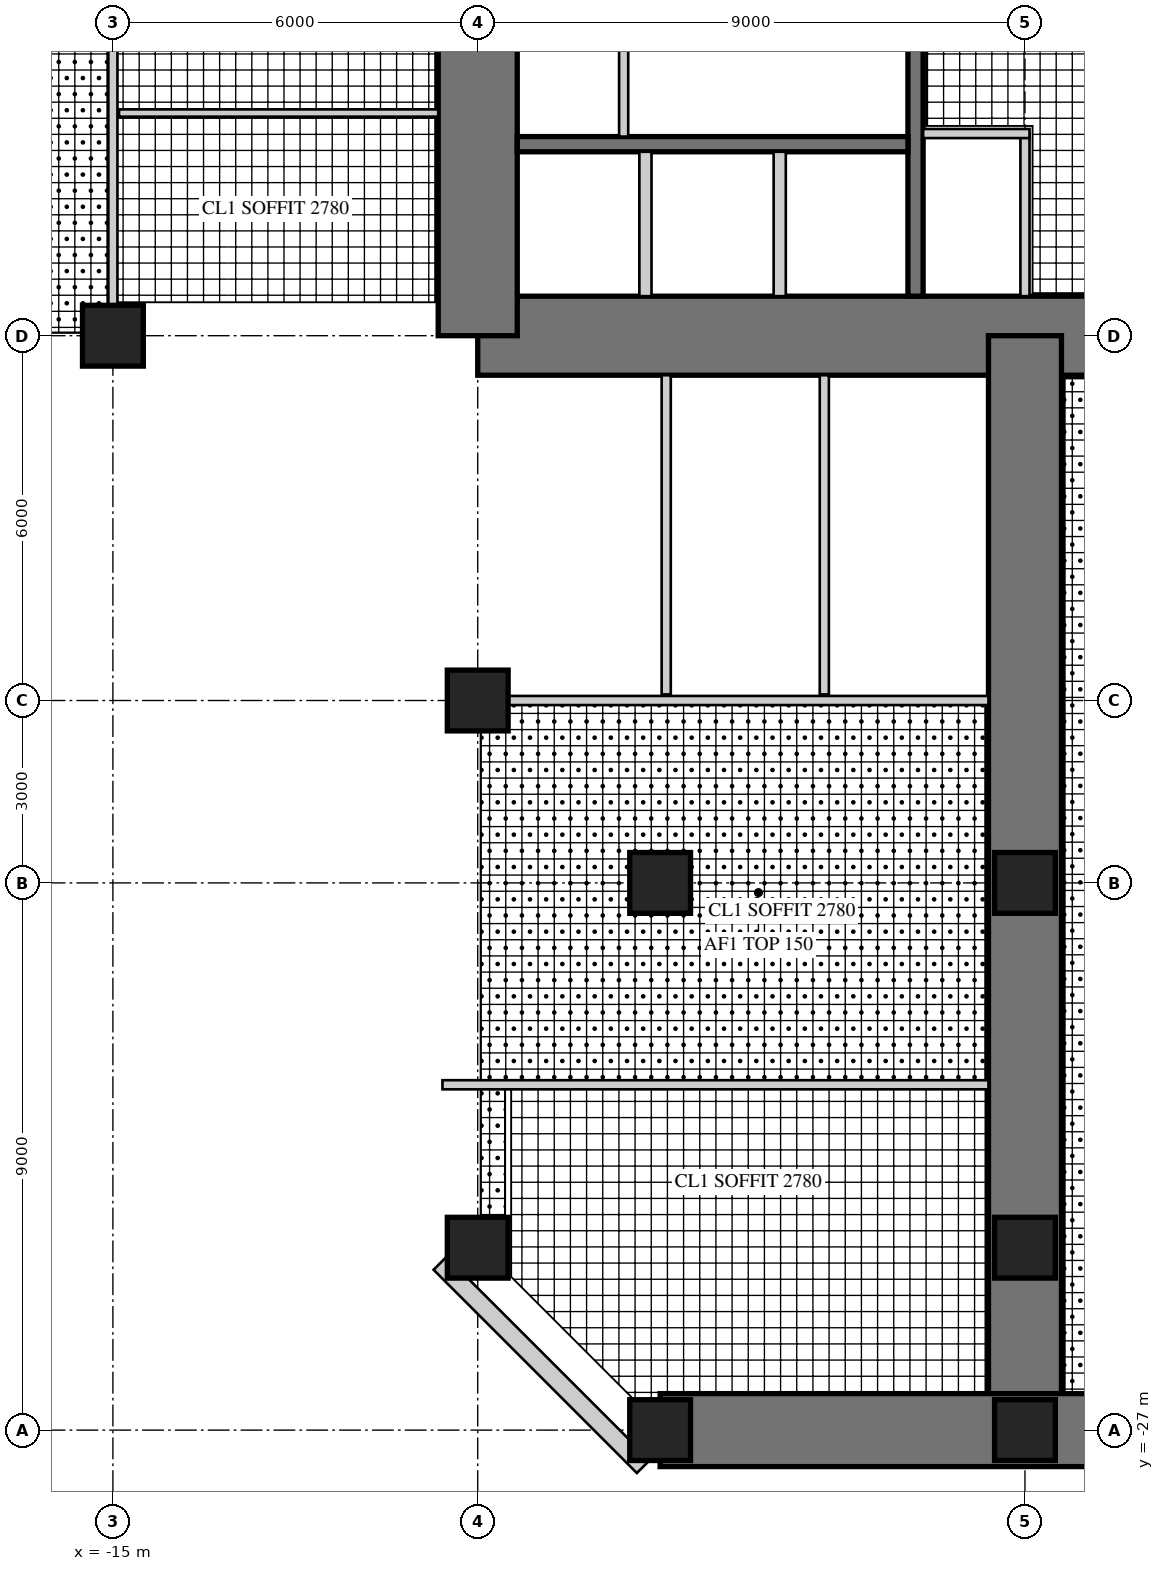
"""IFC4 building model, lengths in metres.
Left out: names, types, materials, properties, quantities, classifications, styles, units other than length and angle.
Written with IfcOpenShell. Run it as: python <this file> out.ifc"""

import sys

from ifc_helpers import new_model, si_unit, direction, frame, frame_2d, origin, origin_2d, place, context, subcontext, project, spatial, rectangle, hollow_rectangle, extrude, element, fill, save


model = new_model("IFC4")
c1 = context("Model", 3, precision=1e-05, world=origin(), true_north=direction((0.0, 1.0)))
c2 = subcontext(c1, "Body", "Model", "MODEL_VIEW")
j1 = project(units=[si_unit("LENGTHUNIT", "METRE"), si_unit("PLANEANGLEUNIT", "RADIAN")], contexts=[c1])
p1 = place(None, origin())
s1 = spatial("IfcSite", under=j1, at=p1, CompositionType="ELEMENT")
p2 = place(p1, origin())
s2 = spatial("IfcBuilding", under=s1, at=p2, CompositionType="ELEMENT")
p3 = place(p2, frame((0.0, 0.0, 136.5)))
s3 = spatial("IfcBuildingStorey", under=s2, at=p3, CompositionType="ELEMENT", Elevation=136.5)
p4 = place(p3, frame((-9.0, -9.0, 0.0), z_axis=(0.0, 0.0, 1.0), x_axis=(1.0, 0.0, 0.0)))
e1 = element("IfcWall", 1, at=p4, inside=s3, PredefinedType="SHEAR", context=c2, shape_type="SweptSolid", body=[
    extrude(rectangle(XDim=18.0, YDim=1.3, at=frame_2d((9.0, 0.0))), origin(), (0.0, 0.0, 1.0), 4.0),
])
p5 = place(p4, frame((9.8, 0.0, 0.0)))
e2 = element("IfcOpeningElement", 2, at=p5, cuts=e1, PredefinedType="OPENING", context=c2, shape_type="SweptSolid", body=[
    extrude(rectangle(XDim=1.0, YDim=2.4, at=frame_2d((0.5, 1.2))), frame((0.0, 0.66, 0.0), z_axis=(0.0, -1.0, 0.0), x_axis=(1.0, 0.0, 0.0)), (0.0, 0.0, 1.0), 1.32),
])
p6 = place(p3, frame((-9.0, 9.0, 0.0), z_axis=(0.0, 0.0, 1.0), x_axis=(0.0, -1.0, 0.0)))
e3 = element("IfcWall", 3, at=p6, inside=s3, PredefinedType="SHEAR", context=c2, shape_type="SweptSolid", body=[
    extrude(rectangle(XDim=18.0, YDim=1.3, at=frame_2d((9.0, 0.0))), origin(), (0.0, 0.0, 1.0), 4.0),
])
p7 = place(p6, frame((9.8, 0.0, 0.0)))
e4 = element("IfcOpeningElement", 4, at=p7, cuts=e3, PredefinedType="OPENING", context=c2, shape_type="SweptSolid", body=[
    extrude(rectangle(XDim=1.0, YDim=2.4, at=frame_2d((0.5, 1.2))), frame((0.0, 0.66, 0.0), z_axis=(0.0, -1.0, 0.0), x_axis=(1.0, 0.0, 0.0)), (0.0, 0.0, 1.0), 1.32),
])
p8 = place(p3, frame((-1.8, -1.875, 0.0), z_axis=(0.0, 0.0, 1.0), x_axis=(0.0, -1.0, 0.0)))
e5 = element("IfcWall", 5, at=p8, inside=s3, PredefinedType="SHEAR", context=c2, shape_type="SweptSolid", body=[
    extrude(rectangle(XDim=6.475, YDim=0.25, at=frame_2d((3.238, 0.0))), origin(), (0.0, 0.0, 1.0), 4.0),
])
p9 = place(p8, frame((1.875, 0.0, 0.0)))
e6 = element("IfcOpeningElement", 6, at=p9, cuts=e5, PredefinedType="OPENING", context=c2, shape_type="SweptSolid", body=[
    extrude(rectangle(XDim=1.6, YDim=2.4, at=frame_2d((0.8, 1.2))), frame((0.0, 0.135, 0.0), z_axis=(0.0, -1.0, 0.0), x_axis=(1.0, 0.0, 0.0)), (0.0, 0.0, 1.0), 0.27),
])
p10 = place(p3, frame((-1.925, -5.85, 0.0), z_axis=(0.0, 0.0, 1.0), x_axis=(-1.0, 0.0, 0.0)))
e7 = element("IfcWall", 7, at=p10, inside=s3, PredefinedType="SHEAR", context=c2, shape_type="SweptSolid", body=[
    extrude(rectangle(XDim=6.425, YDim=0.25, at=frame_2d((3.212, 0.0))), origin(), (0.0, 0.0, 1.0), 4.0),
])
for number, where, z_axis, x_axis in (
    (8, (-4.033, -5.975, 0.0), (0.0, 0.0, 1.0), (0.0, -1.0, 0.0)),
    (9, (-6.242, -5.975, 0.0), (0.0, 0.0, 1.0), (0.0, -1.0, 0.0)),
):
    element("IfcWall", number, at=place(p3, frame(where, z_axis=z_axis, x_axis=x_axis)), inside=s3, PredefinedType="PARTITIONING", context=c2, shape_type="SweptSolid", body=[
        extrude(rectangle(XDim=2.375, YDim=0.2, at=frame_2d((1.188, 0.0))), origin(), (0.0, 0.0, 1.0), 4.0),
    ])
p11 = place(p3, frame((0.0, -9.0, 0.0), z_axis=(0.0, 0.0, 1.0), x_axis=(0.0, -1.0, 0.0)))
e10 = element("IfcWall", 10, at=p11, inside=s3, PredefinedType="SHEAR", context=c2, shape_type="SweptSolid", body=[
    extrude(rectangle(XDim=18.0, YDim=1.2, at=frame_2d((9.0, 0.0))), origin(), (0.0, 0.0, 1.0), 4.0),
])
p12 = place(p11, frame((9.8, 0.0, 0.0)))
e11 = element("IfcOpeningElement", 11, at=p12, cuts=e10, PredefinedType="OPENING", context=c2, shape_type="SweptSolid", body=[
    extrude(rectangle(XDim=1.0, YDim=2.2, at=frame_2d((0.5, 1.1))), frame((0.0, 0.61, 0.0), z_axis=(0.0, -1.0, 0.0), x_axis=(1.0, 0.0, 0.0)), (0.0, 0.0, 1.0), 1.22),
])
p13 = place(p3, frame((-6.0, -27.0, 0.0), z_axis=(0.0, 0.0, 1.0), x_axis=(1.0, 0.0, 0.0)))
e12 = element("IfcWall", 12, at=p13, inside=s3, PredefinedType="SHEAR", context=c2, shape_type="SweptSolid", body=[
    extrude(rectangle(XDim=12.0, YDim=1.2, at=frame_2d((6.0, 0.0))), origin(), (0.0, 0.0, 1.0), 4.0),
])
p14 = place(p13, frame((1.55, 0.0, 0.6)))
e13 = element("IfcOpeningElement", 13, at=p14, cuts=e12, PredefinedType="OPENING", context=c2, shape_type="SweptSolid", body=[
    extrude(rectangle(XDim=3.0, YDim=2.4, at=frame_2d((1.5, 1.2))), frame((0.0, 0.61, 0.0), z_axis=(0.0, -1.0, 0.0), x_axis=(1.0, 0.0, 0.0)), (0.0, 0.0, 1.0), 1.22),
])
p15 = place(p13, frame((7.45, 0.0, 0.6)))
e14 = element("IfcOpeningElement", 14, at=p15, cuts=e12, PredefinedType="OPENING", context=c2, shape_type="SweptSolid", body=[
    extrude(rectangle(XDim=3.0, YDim=2.4, at=frame_2d((1.5, 1.2))), frame((0.0, 0.61, 0.0), z_axis=(0.0, -1.0, 0.0), x_axis=(1.0, 0.0, 0.0)), (0.0, 0.0, 1.0), 1.22),
])
for number, where, z_axis, x_axis in (
    (15, (-9.0, -15.0, 0.0), (0.0, 0.0, 1.0), (1.0, 0.0, 0.0)),
    (16, (-9.0, -24.0, 0.0), (0.0, 0.0, 1.0), (1.0, 0.0, 0.0)),
    (17, (-6.0, -27.0, 0.0), (0.0, 0.0, 1.0), (1.0, 0.0, 0.0)),
    (18, (0.0, -27.0, 0.0), (0.0, 0.0, 1.0), (1.0, 0.0, 0.0)),
    (19, (-15.0, -9.0, 0.0), (0.0, 0.0, 1.0), (1.0, 0.0, 0.0)),
    (20, (-6.0, -18.0, 0.0), (0.0, 0.0, 1.0), (1.0, 0.0, 0.0)),
    (21, (0.0, -18.0, 0.0), (0.0, 0.0, 1.0), (1.0, 0.0, 0.0)),
    (22, (0.0, -24.0, 0.0), (0.0, 0.0, 1.0), (1.0, 0.0, 0.0)),
):
    element("IfcColumn", number, at=place(p3, frame(where, z_axis=z_axis, x_axis=x_axis)), inside=s3, PredefinedType="COLUMN", context=c2, shape_type="SweptSolid", body=[
        extrude(rectangle(XDim=1.0, YDim=1.0, at=origin_2d()), origin(), (0.0, 0.0, 1.0), 4.0),
    ])
p16 = place(p3, frame((-9.62, -24.257, 0.0), z_axis=(0.0, 0.0, 1.0), x_axis=(0.707106781187, -0.707106781187, 0.0)))
e23 = element("IfcWall", 23, at=p16, inside=s3, PredefinedType="SOLIDWALL", context=c2, shape_type="SweptSolid", body=[
    extrude(rectangle(XDim=4.728, YDim=0.3, at=frame_2d((2.364, 0.0))), origin(), (0.0, 0.0, 1.0), 3.8),
])
p17 = place(p16, frame((1.914, 0.0, 0.3)))
e24 = element("IfcOpeningElement", 24, at=p17, cuts=e23, PredefinedType="OPENING", context=c2, shape_type="SweptSolid", body=[
    extrude(rectangle(XDim=0.9, YDim=2.4, at=frame_2d((0.45, 1.2))), frame((0.0, 0.16, 0.0), z_axis=(0.0, -1.0, 0.0), x_axis=(1.0, 0.0, 0.0)), (0.0, 0.0, 1.0), 0.32),
])
p18 = place(p3, frame((0.0, -5.675, 0.0), z_axis=(0.0, 0.0, 1.0), x_axis=(0.0, -1.0, 0.0)))
e25 = element("IfcWall", 25, at=p18, inside=s3, PredefinedType="PARTITIONING", context=c2, shape_type="SweptSolid", body=[
    extrude(rectangle(XDim=2.675, YDim=0.15, at=frame_2d((1.337, 0.0))), origin(), (0.0, 0.0, 1.0), 3.8),
])
p19 = place(p18, frame((0.4, 0.0, 0.0)))
e26 = element("IfcOpeningElement", 26, at=p19, cuts=e25, PredefinedType="OPENING", context=c2, shape_type="SweptSolid", body=[
    extrude(rectangle(XDim=1.0, YDim=2.1, at=frame_2d((0.5, 1.05))), frame((0.0, 0.085, 0.0), z_axis=(0.0, -1.0, 0.0), x_axis=(1.0, 0.0, 0.0)), (0.0, 0.0, 1.0), 0.17),
])
p20 = place(p3, frame((-1.675, -5.675, 0.0), z_axis=(0.0, 0.0, 1.0), x_axis=(1.0, 0.0, 0.0)))
e27 = element("IfcWall", 27, at=p20, inside=s3, PredefinedType="PARTITIONING", context=c2, shape_type="SweptSolid", body=[
    extrude(rectangle(XDim=1.75, YDim=0.15, at=frame_2d((0.875, 0.0))), origin(), (0.0, 0.0, 1.0), 3.8),
])
p21 = place(p3, frame((-6.6, -3.375, 0.0), z_axis=(0.0, 0.0, 1.0), x_axis=(0.0, -1.0, 0.0)))
e28 = element("IfcWall", 28, at=p21, inside=s3, PredefinedType="PARTITIONING", context=c2, shape_type="SweptSolid", body=[
    extrude(rectangle(XDim=2.35, YDim=0.15, at=frame_2d((1.175, 0.0))), origin(), (0.0, 0.0, 1.0), 3.8),
])
p22 = place(p21, frame((0.45, 0.0, 0.0)))
e29 = element("IfcOpeningElement", 29, at=p22, cuts=e28, PredefinedType="OPENING", context=c2, shape_type="SweptSolid", body=[
    extrude(rectangle(XDim=1.0, YDim=2.1, at=frame_2d((0.5, 1.05))), frame((0.0, 0.085, 0.0), z_axis=(0.0, -1.0, 0.0), x_axis=(1.0, 0.0, 0.0)), (0.0, 0.0, 1.0), 0.17),
])
p23 = place(p3, frame((-8.5, -15.0, 0.0), z_axis=(0.0, 0.0, 1.0), x_axis=(1.0, 0.0, 0.0)))
e30 = element("IfcWall", 30, at=p23, inside=s3, PredefinedType="PARTITIONING", context=c2, shape_type="SweptSolid", body=[
    extrude(rectangle(XDim=7.9, YDim=0.15, at=frame_2d((3.95, 0.0))), origin(), (0.0, 0.0, 1.0), 3.0),
])
p24 = place(p23, frame((0.8, 0.0, 0.0)))
e31 = element("IfcOpeningElement", 31, at=p24, cuts=e30, PredefinedType="OPENING", context=c2, shape_type="SweptSolid", body=[
    extrude(rectangle(XDim=1.0, YDim=2.1, at=frame_2d((0.5, 1.05))), frame((0.0, 0.085, 0.0), z_axis=(0.0, -1.0, 0.0), x_axis=(1.0, 0.0, 0.0)), (0.0, 0.0, 1.0), 0.17),
])
p25 = place(p23, frame((3.4, 0.0, 0.0)))
e32 = element("IfcOpeningElement", 32, at=p25, cuts=e30, PredefinedType="OPENING", context=c2, shape_type="SweptSolid", body=[
    extrude(rectangle(XDim=1.0, YDim=2.1, at=frame_2d((0.5, 1.05))), frame((0.0, 0.085, 0.0), z_axis=(0.0, -1.0, 0.0), x_axis=(1.0, 0.0, 0.0)), (0.0, 0.0, 1.0), 0.17),
])
p26 = place(p23, frame((6.05, 0.0, 0.0)))
e33 = element("IfcOpeningElement", 33, at=p26, cuts=e30, PredefinedType="OPENING", context=c2, shape_type="SweptSolid", body=[
    extrude(rectangle(XDim=1.0, YDim=2.1, at=frame_2d((0.5, 1.05))), frame((0.0, 0.085, 0.0), z_axis=(0.0, -1.0, 0.0), x_axis=(1.0, 0.0, 0.0)), (0.0, 0.0, 1.0), 0.17),
])
p27 = place(p3, frame((-3.3, -9.65, 0.0), z_axis=(0.0, 0.0, 1.0), x_axis=(0.0, -1.0, 0.0)))
e34 = element("IfcWall", 34, at=p27, inside=s3, PredefinedType="PARTITIONING", context=c2, shape_type="SweptSolid", body=[
    extrude(rectangle(XDim=5.25, YDim=0.15, at=frame_2d((2.625, 0.0))), origin(), (0.0, 0.0, 1.0), 3.8),
])
p28 = place(p3, frame((-5.9, -9.65, 0.0), z_axis=(0.0, 0.0, 1.0), x_axis=(0.0, -1.0, 0.0)))
e35 = element("IfcWall", 35, at=p28, inside=s3, PredefinedType="PARTITIONING", context=c2, shape_type="SweptSolid", body=[
    extrude(rectangle(XDim=5.25, YDim=0.15, at=frame_2d((2.625, 0.0))), origin(), (0.0, 0.0, 1.0), 3.1),
])
p29 = place(p3, frame((-9.58, -21.32, 0.0), z_axis=(0.0, 0.0, 1.0), x_axis=(1.0, 0.0, 0.0)))
e36 = element("IfcWall", 36, at=p29, inside=s3, PredefinedType="PARTITIONING", context=c2, shape_type="SweptSolid", body=[
    extrude(rectangle(XDim=8.98, YDim=0.15, at=frame_2d((4.49, 0.0))), origin(), (0.0, 0.0, 1.0), 3.8),
])
p30 = place(p29, frame((7.53, 0.0, 0.0)))
e37 = element("IfcOpeningElement", 37, at=p30, cuts=e36, PredefinedType="OPENING", context=c2, shape_type="SweptSolid", body=[
    extrude(rectangle(XDim=1.0, YDim=2.2, at=frame_2d((0.5, 1.1))), frame((0.0, 0.085, 0.0), z_axis=(0.0, -1.0, 0.0), x_axis=(1.0, 0.0, 0.0)), (0.0, 0.0, 1.0), 0.17),
])
p31 = place(p3, frame((-15.0, -2.175, 0.0), z_axis=(0.0, 0.0, 1.0), x_axis=(0.0, -1.0, 0.0)))
e38 = element("IfcWall", 38, at=p31, inside=s3, PredefinedType="PARTITIONING", context=c2, shape_type="SweptSolid", body=[
    extrude(rectangle(XDim=6.325, YDim=0.15, at=frame_2d((3.163, 0.0))), origin(), (0.0, 0.0, 1.0), 3.0),
])
p32 = place(p31, frame((1.081, 0.0, 0.0)))
e39 = element("IfcOpeningElement", 39, at=p32, cuts=e38, PredefinedType="OPENING", context=c2, shape_type="SweptSolid", body=[
    extrude(rectangle(XDim=1.0, YDim=2.1, at=frame_2d((0.5, 1.05))), frame((0.0, 0.085, 0.0), z_axis=(0.0, -1.0, 0.0), x_axis=(1.0, 0.0, 0.0)), (0.0, 0.0, 1.0), 0.17),
])
p33 = place(p31, frame((4.244, 0.0, 0.0)))
e40 = element("IfcOpeningElement", 40, at=p33, cuts=e38, PredefinedType="OPENING", context=c2, shape_type="SweptSolid", body=[
    extrude(rectangle(XDim=1.0, YDim=2.1, at=frame_2d((0.5, 1.05))), frame((0.0, 0.085, 0.0), z_axis=(0.0, -1.0, 0.0), x_axis=(1.0, 0.0, 0.0)), (0.0, 0.0, 1.0), 0.17),
])
p34 = place(p3, frame((-9.65, -5.337, 0.0), z_axis=(0.0, 0.0, 1.0), x_axis=(-1.0, 0.0, 0.0)))
e41 = element("IfcWall", 41, at=p34, inside=s3, PredefinedType="PLUMBINGWALL", context=c2, shape_type="SweptSolid", body=[
    extrude(rectangle(XDim=5.25, YDim=0.12, at=frame_2d((2.625, 0.0))), origin(), (0.0, 0.0, 1.0), 3.8),
])
p35 = place(p17, origin())
e42 = element("IfcWindow", 42, at=p35, inside=s3, PartitioningType="SINGLE_PANEL", PredefinedType="WINDOW", context=c2, shape_type="SweptSolid", body=[
    extrude(hollow_rectangle(XDim=0.9, YDim=2.4, WallThickness=0.06, at=frame_2d((0.45, 1.2))), frame((0.0, 0.03, 0.0), z_axis=(0.0, -1.0, 0.0), x_axis=(1.0, 0.0, 0.0)), (0.0, 0.0, 1.0), 0.06),
    extrude(rectangle(XDim=0.779, YDim=2.279, at=frame_2d((0.45, 1.2))), frame((0.0, 0.03, 0.0), z_axis=(0.0, -1.0, 0.0), x_axis=(1.0, 0.0, 0.0)), (0.0, 0.0, 1.0), 0.06),
])
fill(e24, e42)
p36 = place(p14, origin())
e43 = element("IfcWindow", 43, at=p36, inside=s3, PartitioningType="SINGLE_PANEL", PredefinedType="WINDOW", context=c2, shape_type="SweptSolid", body=[
    extrude(hollow_rectangle(XDim=3.0, YDim=2.4, WallThickness=0.06, at=frame_2d((1.5, 1.2))), frame((0.0, 0.03, 0.0), z_axis=(0.0, -1.0, 0.0), x_axis=(1.0, 0.0, 0.0)), (0.0, 0.0, 1.0), 0.06),
    extrude(rectangle(XDim=2.879, YDim=2.279, at=frame_2d((1.5, 1.2))), frame((0.0, 0.03, 0.0), z_axis=(0.0, -1.0, 0.0), x_axis=(1.0, 0.0, 0.0)), (0.0, 0.0, 1.0), 0.06),
])
fill(e13, e43)
p37 = place(p19, frame((1.0, 0.0, 0.0), z_axis=(0.0, 0.0, 1.0), x_axis=(-1.0, 0.0, 0.0)))
e44 = element("IfcDoor", 44, at=p37, inside=s3, OperationType="SINGLE_SWING_RIGHT", PredefinedType="DOOR", context=c2, shape_type="SweptSolid", body=[
    extrude(rectangle(XDim=1.0, YDim=2.1, at=frame_2d((0.5, 1.05))), frame((0.0, 0.025, 0.0), z_axis=(0.0, -1.0, 0.0), x_axis=(1.0, 0.0, 0.0)), (0.0, 0.0, 1.0), 0.05),
])
fill(e26, e44)
p38 = place(p22, frame((1.0, 0.0, 0.0), z_axis=(0.0, 0.0, 1.0), x_axis=(-1.0, 0.0, 0.0)))
e45 = element("IfcDoor", 45, at=p38, inside=s3, OperationType="SINGLE_SWING_RIGHT", PredefinedType="DOOR", context=c2, shape_type="SweptSolid", body=[
    extrude(rectangle(XDim=1.0, YDim=2.1, at=frame_2d((0.5, 1.05))), frame((0.0, 0.025, 0.0), z_axis=(0.0, -1.0, 0.0), x_axis=(1.0, 0.0, 0.0)), (0.0, 0.0, 1.0), 0.05),
])
fill(e29, e45)
p39 = place(p24, origin())
e46 = element("IfcDoor", 46, at=p39, inside=s3, OperationType="SINGLE_SWING_RIGHT", PredefinedType="DOOR", context=c2, shape_type="SweptSolid", body=[
    extrude(rectangle(XDim=1.0, YDim=2.1, at=frame_2d((0.5, 1.05))), frame((0.0, 0.025, 0.0), z_axis=(0.0, -1.0, 0.0), x_axis=(1.0, 0.0, 0.0)), (0.0, 0.0, 1.0), 0.05),
])
fill(e31, e46)
p40 = place(p25, origin())
e47 = element("IfcDoor", 47, at=p40, inside=s3, OperationType="SINGLE_SWING_LEFT", PredefinedType="DOOR", context=c2, shape_type="SweptSolid", body=[
    extrude(rectangle(XDim=1.0, YDim=2.1, at=frame_2d((0.5, 1.05))), frame((0.0, 0.025, 0.0), z_axis=(0.0, -1.0, 0.0), x_axis=(1.0, 0.0, 0.0)), (0.0, 0.0, 1.0), 0.05),
])
fill(e32, e47)
p41 = place(p26, origin())
e48 = element("IfcDoor", 48, at=p41, inside=s3, OperationType="SINGLE_SWING_LEFT", PredefinedType="DOOR", context=c2, shape_type="SweptSolid", body=[
    extrude(rectangle(XDim=1.0, YDim=2.1, at=frame_2d((0.5, 1.05))), frame((0.0, 0.025, 0.0), z_axis=(0.0, -1.0, 0.0), x_axis=(1.0, 0.0, 0.0)), (0.0, 0.0, 1.0), 0.05),
])
fill(e33, e48)
p42 = place(p30, frame((1.0, 0.0, 0.0), z_axis=(0.0, 0.0, 1.0), x_axis=(-1.0, 0.0, 0.0)))
e49 = element("IfcDoor", 49, at=p42, inside=s3, OperationType="SINGLE_SWING_LEFT", PredefinedType="DOOR", context=c2, shape_type="SweptSolid", body=[
    extrude(rectangle(XDim=1.0, YDim=2.2, at=frame_2d((0.5, 1.1))), frame((0.0, 0.025, 0.0), z_axis=(0.0, -1.0, 0.0), x_axis=(1.0, 0.0, 0.0)), (0.0, 0.0, 1.0), 0.05),
])
fill(e37, e49)
p43 = place(p33, origin())
e50 = element("IfcDoor", 50, at=p43, inside=s3, OperationType="SINGLE_SWING_LEFT", PredefinedType="DOOR", context=c2, shape_type="SweptSolid", body=[
    extrude(rectangle(XDim=1.0, YDim=2.1, at=frame_2d((0.5, 1.05))), frame((0.0, 0.025, 0.0), z_axis=(0.0, -1.0, 0.0), x_axis=(1.0, 0.0, 0.0)), (0.0, 0.0, 1.0), 0.05),
])
fill(e40, e50)
p44 = place(p12, frame((1.0, 0.0, 0.0), z_axis=(0.0, 0.0, 1.0), x_axis=(-1.0, 0.0, 0.0)))
e51 = element("IfcDoor", 51, at=p44, inside=s3, OperationType="SINGLE_SWING_LEFT", PredefinedType="DOOR", context=c2, shape_type="SweptSolid", body=[
    extrude(rectangle(XDim=1.0, YDim=2.2, at=frame_2d((0.5, 1.1))), frame((0.0, 0.025, 0.0), z_axis=(0.0, -1.0, 0.0), x_axis=(1.0, 0.0, 0.0)), (0.0, 0.0, 1.0), 0.05),
])
fill(e11, e51)
p45 = place(p5, frame((1.0, 0.0, 0.0), z_axis=(0.0, 0.0, 1.0), x_axis=(-1.0, 0.0, 0.0)))
e52 = element("IfcDoor", 52, at=p45, inside=s3, OperationType="SINGLE_SWING_RIGHT", PredefinedType="DOOR", context=c2, shape_type="SweptSolid", body=[
    extrude(rectangle(XDim=1.0, YDim=2.4, at=frame_2d((0.5, 1.2))), frame((0.0, -0.005, 0.0), z_axis=(0.0, -1.0, 0.0), x_axis=(1.0, 0.0, 0.0)), (0.0, 0.0, 1.0), 0.05),
])
fill(e2, e52)
p46 = place(p9, frame((1.6, 0.0, 0.0), z_axis=(0.0, 0.0, 1.0), x_axis=(-1.0, 0.0, 0.0)))
e53 = element("IfcDoor", 53, at=p46, inside=s3, OperationType="DOUBLE_DOOR_SINGLE_SWING", PredefinedType="DOOR", context=c2, shape_type="SweptSolid", body=[
    extrude(rectangle(XDim=1.6, YDim=2.4, at=frame_2d((0.8, 1.2))), frame((0.0, 0.025, 0.0), z_axis=(0.0, -1.0, 0.0), x_axis=(1.0, 0.0, 0.0)), (0.0, 0.0, 1.0), 0.05),
])
fill(e6, e53)
save(model, sys.argv[1])
